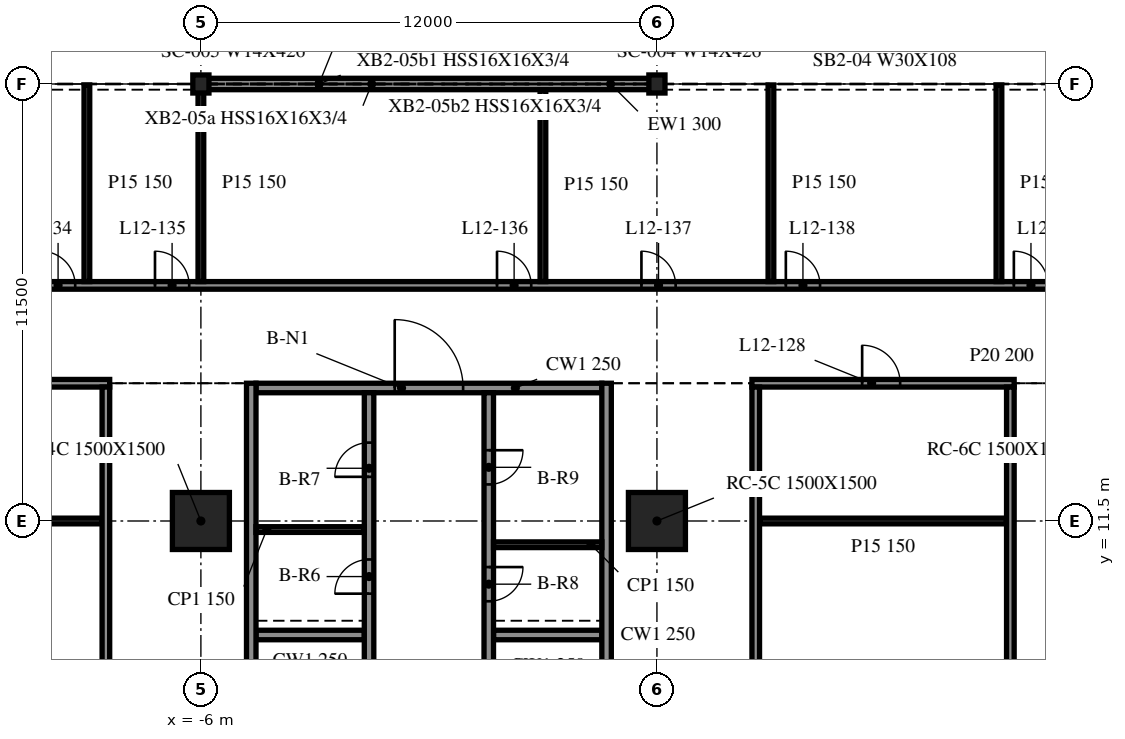
"""IFC4 building model, lengths in metres.
Left out: names, types, materials, properties, quantities, classifications, styles, units other than length and angle.
Written with IfcOpenShell. Run it as: python <this file> out.ifc"""

import sys

from ifc_helpers import new_model, si_unit, direction, frame, frame_2d, origin, origin_2d, place, context, subcontext, project, spatial, rectangle, i_section, extrude, element, fill, save


model = new_model("IFC4")
c1 = context("Model", 3, precision=1e-05, world=origin(), true_north=direction((0.0, 1.0)))
c2 = subcontext(c1, "Body", "Model", "MODEL_VIEW")
j1 = project(units=[si_unit("LENGTHUNIT", "METRE"), si_unit("PLANEANGLEUNIT", "RADIAN")], contexts=[c1])
p1 = place(None, origin())
s1 = spatial("IfcSite", under=j1, at=p1, CompositionType="ELEMENT")
p2 = place(p1, origin())
s2 = spatial("IfcBuilding", under=s1, at=p2, CompositionType="ELEMENT")
p3 = place(p2, frame((0.0, 0.0, 54.6)))
s3 = spatial("IfcBuildingStorey", under=s2, at=p3, CompositionType="ELEMENT", Elevation=54.6)
for number, where, z_axis, x_axis in (
    (1, (-6.0, 11.5, -0.34), (0.0, 0.0, 1.0), (1.0, 0.0, 0.0)),
    (2, (6.0, 11.5, -0.34), (0.0, 0.0, 1.0), (1.0, 0.0, 0.0)),
):
    element("IfcColumn", number, at=place(p3, frame(where, z_axis=z_axis, x_axis=x_axis)), inside=s3, PredefinedType="COLUMN", context=c2, shape_type="SweptSolid", body=[
        extrude(rectangle(XDim=1.5, YDim=1.5, at=origin_2d()), origin(), (0.0, 0.0, 1.0), 4.3),
    ])
for number, where, z_axis, x_axis in (
    (3, (6.0, 23.0, -0.34), (0.0, 0.0, 1.0), (1.0, 0.0, 0.0)),
    (4, (-6.0, 23.0, -0.34), (0.0, 0.0, 1.0), (1.0, 0.0, 0.0)),
):
    element("IfcColumn", number, at=place(p3, frame(where, z_axis=z_axis, x_axis=x_axis)), inside=s3, PredefinedType="COLUMN", context=c2, shape_type="SweptSolid", body=[
        extrude(i_section(OverallWidth=0.424, OverallDepth=0.475, WebThickness=0.048, FlangeThickness=0.077, at=origin_2d()), origin(), (0.0, 0.0, 1.0), 4.3),
    ])
p4 = place(p3, frame((5.976, 23.0, 0.0), z_axis=(0.0, 0.0, 1.0), x_axis=(-1.0, 0.0, 0.0)))
e5 = element("IfcWall", 5, at=p4, inside=s3, PredefinedType="NOTDEFINED", context=c2, shape_type="SweptSolid", body=[
    extrude(rectangle(XDim=11.952, YDim=0.3, at=frame_2d((5.976, 0.0))), origin(), (0.0, 0.0, 1.0), 3.203),
])
for number, where, z_axis, x_axis in (
    (6, (-4.675, 15.125, 0.0), (0.0, 0.0, 1.0), (0.0, -1.0, 0.0)),
    (7, (4.675, -9.125, 0.0), (0.0, 0.0, 1.0), (0.0, 1.0, 0.0)),
):
    element("IfcWall", number, at=place(p3, frame(where, z_axis=z_axis, x_axis=x_axis)), inside=s3, PredefinedType="SOLIDWALL", context=c2, shape_type="SweptSolid", body=[
        extrude(rectangle(XDim=24.25, YDim=0.25, at=frame_2d((12.125, 0.0))), origin(), (0.0, 0.0, 1.0), 3.96),
    ])
p5 = place(p3, frame((-4.55, 15.0, 0.0), z_axis=(0.0, 0.0, 1.0), x_axis=(1.0, 0.0, 0.0)))
e8 = element("IfcWall", 8, at=p5, inside=s3, PredefinedType="SOLIDWALL", context=c2, shape_type="SweptSolid", body=[
    extrude(rectangle(XDim=9.1, YDim=0.25, at=frame_2d((4.55, 0.0))), origin(), (0.0, 0.0, 1.0), 3.96),
])
p6 = place(p5, frame((3.65, 0.0, 0.0)))
e9 = element("IfcOpeningElement", 9, at=p6, cuts=e8, PredefinedType="OPENING", context=c2, shape_type="SweptSolid", body=[
    extrude(rectangle(XDim=1.8, YDim=2.1, at=frame_2d((0.9, 1.05))), frame((0.0, 0.135, 0.0), z_axis=(0.0, -1.0, 0.0), x_axis=(1.0, 0.0, 0.0)), (0.0, 0.0, 1.0), 0.27),
])
p7 = place(p3, frame((-1.575, -8.875, 0.0), z_axis=(0.0, 0.0, 1.0), x_axis=(0.0, 1.0, 0.0)))
e10 = element("IfcWall", 10, at=p7, inside=s3, PredefinedType="SOLIDWALL", context=c2, shape_type="SweptSolid", body=[
    extrude(rectangle(XDim=23.75, YDim=0.25, at=frame_2d((11.875, 0.0))), origin(), (0.0, 0.0, 1.0), 3.96),
])
p8 = place(p7, frame((11.425, 0.0, 0.0)))
e11 = element("IfcOpeningElement", 11, at=p8, cuts=e10, PredefinedType="OPENING", context=c2, shape_type="SweptSolid", body=[
    extrude(rectangle(XDim=0.9, YDim=2.1, at=frame_2d((0.45, 1.05))), frame((0.0, 0.135, 0.0), z_axis=(0.0, -1.0, 0.0), x_axis=(1.0, 0.0, 0.0)), (0.0, 0.0, 1.0), 0.27),
])
p9 = place(p7, frame((1.512, 0.0, 0.0)))
e12 = element("IfcOpeningElement", 12, at=p9, cuts=e10, PredefinedType="OPENING", context=c2, shape_type="SweptSolid", body=[
    extrude(rectangle(XDim=0.9, YDim=2.1, at=frame_2d((0.45, 1.05))), frame((0.0, 0.135, 0.0), z_axis=(0.0, -1.0, 0.0), x_axis=(1.0, 0.0, 0.0)), (0.0, 0.0, 1.0), 0.27),
])
p10 = place(p7, frame((4.587, 0.0, 0.0)))
e13 = element("IfcOpeningElement", 13, at=p10, cuts=e10, PredefinedType="OPENING", context=c2, shape_type="SweptSolid", body=[
    extrude(rectangle(XDim=0.9, YDim=2.1, at=frame_2d((0.45, 1.05))), frame((0.0, 0.135, 0.0), z_axis=(0.0, -1.0, 0.0), x_axis=(1.0, 0.0, 0.0)), (0.0, 0.0, 1.0), 0.27),
])
p11 = place(p7, frame((18.462, 0.0, 0.0)))
e14 = element("IfcOpeningElement", 14, at=p11, cuts=e10, PredefinedType="OPENING", context=c2, shape_type="SweptSolid", body=[
    extrude(rectangle(XDim=0.9, YDim=2.1, at=frame_2d((0.45, 1.05))), frame((0.0, 0.135, 0.0), z_axis=(0.0, -1.0, 0.0), x_axis=(1.0, 0.0, 0.0)), (0.0, 0.0, 1.0), 0.27),
])
p12 = place(p7, frame((21.538, 0.0, 0.0)))
e15 = element("IfcOpeningElement", 15, at=p12, cuts=e10, PredefinedType="OPENING", context=c2, shape_type="SweptSolid", body=[
    extrude(rectangle(XDim=0.9, YDim=2.1, at=frame_2d((0.45, 1.05))), frame((0.0, 0.135, 0.0), z_axis=(0.0, -1.0, 0.0), x_axis=(1.0, 0.0, 0.0)), (0.0, 0.0, 1.0), 0.27),
])
p13 = place(p3, frame((1.575, 14.875, 0.0), z_axis=(0.0, 0.0, 1.0), x_axis=(0.0, -1.0, 0.0)))
e16 = element("IfcWall", 16, at=p13, inside=s3, PredefinedType="SOLIDWALL", context=c2, shape_type="SweptSolid", body=[
    extrude(rectangle(XDim=17.5, YDim=0.25, at=frame_2d((8.75, 0.0))), origin(), (0.0, 0.0, 1.0), 3.96),
])
p14 = place(p13, frame((14.15, 0.0, 0.0)))
e17 = element("IfcOpeningElement", 17, at=p14, cuts=e16, PredefinedType="OPENING", context=c2, shape_type="SweptSolid", body=[
    extrude(rectangle(XDim=0.9, YDim=2.1, at=frame_2d((0.45, 1.05))), frame((0.0, 0.135, 0.0), z_axis=(0.0, -1.0, 0.0), x_axis=(1.0, 0.0, 0.0)), (0.0, 0.0, 1.0), 0.27),
])
p15 = place(p13, frame((8.7, 0.0, 0.0)))
e18 = element("IfcOpeningElement", 18, at=p15, cuts=e16, PredefinedType="OPENING", context=c2, shape_type="SweptSolid", body=[
    extrude(rectangle(XDim=0.9, YDim=2.1, at=frame_2d((0.45, 1.05))), frame((0.0, 0.135, 0.0), z_axis=(0.0, -1.0, 0.0), x_axis=(1.0, 0.0, 0.0)), (0.0, 0.0, 1.0), 0.27),
])
p16 = place(p13, frame((4.587, 0.0, 0.0)))
e19 = element("IfcOpeningElement", 19, at=p16, cuts=e16, PredefinedType="OPENING", context=c2, shape_type="SweptSolid", body=[
    extrude(rectangle(XDim=0.9, YDim=2.1, at=frame_2d((0.45, 1.05))), frame((0.0, 0.135, 0.0), z_axis=(0.0, -1.0, 0.0), x_axis=(1.0, 0.0, 0.0)), (0.0, 0.0, 1.0), 0.27),
])
p17 = place(p13, frame((1.512, 0.0, 0.0)))
e20 = element("IfcOpeningElement", 20, at=p17, cuts=e16, PredefinedType="OPENING", context=c2, shape_type="SweptSolid", body=[
    extrude(rectangle(XDim=0.9, YDim=2.1, at=frame_2d((0.45, 1.05))), frame((0.0, 0.135, 0.0), z_axis=(0.0, -1.0, 0.0), x_axis=(1.0, 0.0, 0.0)), (0.0, 0.0, 1.0), 0.27),
])
for number, where, z_axis, x_axis in (
    (21, (-4.55, 8.5, 0.0), (0.0, 0.0, 1.0), (1.0, 0.0, 0.0)),
    (22, (1.7, 8.5, 0.0), (0.0, 0.0, 1.0), (1.0, 0.0, 0.0)),
):
    element("IfcWall", number, at=place(p3, frame(where, z_axis=z_axis, x_axis=x_axis)), inside=s3, PredefinedType="SOLIDWALL", context=c2, shape_type="SweptSolid", body=[
        extrude(rectangle(XDim=2.85, YDim=0.25, at=frame_2d((1.425, 0.0))), origin(), (0.0, 0.0, 1.0), 3.96),
    ])
for number, where, z_axis, x_axis in (
    (23, (-4.55, 11.275, 0.0), (0.0, 0.0, 1.0), (1.0, 0.0, 0.0)),
    (24, (1.7, 10.875, 0.0), (0.0, 0.0, 1.0), (1.0, 0.0, 0.0)),
):
    element("IfcWall", number, at=place(p3, frame(where, z_axis=z_axis, x_axis=x_axis)), inside=s3, PredefinedType="PARTITIONING", context=c2, shape_type="SweptSolid", body=[
        extrude(rectangle(XDim=2.85, YDim=0.15, at=frame_2d((1.425, 0.0))), origin(), (0.0, 0.0, 1.0), 3.96),
    ])
p18 = place(p3, frame((-15.5, 11.5, 0.0), z_axis=(0.0, 0.0, 1.0), x_axis=(1.0, 0.0, 0.0)))
e25 = element("IfcWall", 25, at=p18, inside=s3, PredefinedType="PARTITIONING", context=c2, shape_type="SweptSolid", body=[
    extrude(rectangle(XDim=6.9, YDim=0.15, at=frame_2d((3.45, 0.0))), origin(), (0.0, 0.0, 1.0), 3.96),
])
p19 = place(p3, frame((8.7, 11.5, 0.0), z_axis=(0.0, 0.0, 1.0), x_axis=(1.0, 0.0, 0.0)))
e26 = element("IfcWall", 26, at=p19, inside=s3, PredefinedType="PARTITIONING", context=c2, shape_type="SweptSolid", body=[
    extrude(rectangle(XDim=6.5, YDim=0.15, at=frame_2d((3.25, 0.0))), origin(), (0.0, 0.0, 1.0), 3.96),
])
p20 = place(p3, frame((-15.7, 15.125, 0.0), z_axis=(0.0, 0.0, 1.0), x_axis=(1.0, 0.0, 0.0)))
e27 = element("IfcWall", 27, at=p20, inside=s3, PredefinedType="PARTITIONING", context=c2, shape_type="SweptSolid", body=[
    extrude(rectangle(XDim=7.3, YDim=0.2, at=frame_2d((3.65, 0.0))), origin(), (0.0, 0.0, 1.0), 3.96),
])
p21 = place(p20, frame((3.1, 0.0, 0.0)))
e28 = element("IfcOpeningElement", 28, at=p21, cuts=e27, PredefinedType="OPENING", context=c2, shape_type="SweptSolid", body=[
    extrude(rectangle(XDim=1.0, YDim=2.1, at=frame_2d((0.5, 1.05))), frame((0.0, 0.11, 0.0), z_axis=(0.0, -1.0, 0.0), x_axis=(1.0, 0.0, 0.0)), (0.0, 0.0, 1.0), 0.22),
])
p22 = place(p3, frame((8.5, 15.125, 0.0), z_axis=(0.0, 0.0, 1.0), x_axis=(1.0, 0.0, 0.0)))
e29 = element("IfcWall", 29, at=p22, inside=s3, PredefinedType="PARTITIONING", context=c2, shape_type="SweptSolid", body=[
    extrude(rectangle(XDim=6.9, YDim=0.2, at=frame_2d((3.45, 0.0))), origin(), (0.0, 0.0, 1.0), 3.96),
])
p23 = place(p22, frame((2.9, 0.0, 0.0)))
e30 = element("IfcOpeningElement", 30, at=p23, cuts=e29, PredefinedType="OPENING", context=c2, shape_type="SweptSolid", body=[
    extrude(rectangle(XDim=1.0, YDim=2.1, at=frame_2d((0.5, 1.05))), frame((0.0, 0.11, 0.0), z_axis=(0.0, -1.0, 0.0), x_axis=(1.0, 0.0, 0.0)), (0.0, 0.0, 1.0), 0.22),
])
p24 = place(p3, frame((-41.708, 17.7, 0.0), z_axis=(0.0, 0.0, 1.0), x_axis=(1.0, 0.0, 0.0)))
e31 = element("IfcWall", 31, at=p24, inside=s3, PredefinedType="PARTITIONING", context=c2, shape_type="SweptSolid", body=[
    extrude(rectangle(XDim=95.416, YDim=0.2, at=frame_2d((47.708, 0.0))), origin(), (0.0, 0.0, 1.0), 3.96),
])
p25 = place(p24, frame((7.5, 0.0, 0.0)))
e32 = element("IfcOpeningElement", 32, at=p25, cuts=e31, PredefinedType="OPENING", context=c2, shape_type="SweptSolid", body=[
    extrude(rectangle(XDim=0.9, YDim=2.1, at=frame_2d((0.45, 1.05))), frame((0.0, 0.11, 0.0), z_axis=(0.0, -1.0, 0.0), x_axis=(1.0, 0.0, 0.0)), (0.0, 0.0, 1.0), 0.22),
])
p26 = place(p24, frame((13.5, 0.0, 0.0)))
e33 = element("IfcOpeningElement", 33, at=p26, cuts=e31, PredefinedType="OPENING", context=c2, shape_type="SweptSolid", body=[
    extrude(rectangle(XDim=0.9, YDim=2.1, at=frame_2d((0.45, 1.05))), frame((0.0, 0.11, 0.0), z_axis=(0.0, -1.0, 0.0), x_axis=(1.0, 0.0, 0.0)), (0.0, 0.0, 1.0), 0.22),
])
p27 = place(p24, frame((19.5, 0.0, 0.0)))
e34 = element("IfcOpeningElement", 34, at=p27, cuts=e31, PredefinedType="OPENING", context=c2, shape_type="SweptSolid", body=[
    extrude(rectangle(XDim=0.9, YDim=2.1, at=frame_2d((0.45, 1.05))), frame((0.0, 0.11, 0.0), z_axis=(0.0, -1.0, 0.0), x_axis=(1.0, 0.0, 0.0)), (0.0, 0.0, 1.0), 0.22),
])
p28 = place(p24, frame((31.5, 0.0, 0.0)))
e35 = element("IfcOpeningElement", 35, at=p28, cuts=e31, PredefinedType="OPENING", context=c2, shape_type="SweptSolid", body=[
    extrude(rectangle(XDim=0.9, YDim=2.1, at=frame_2d((0.45, 1.05))), frame((0.0, 0.11, 0.0), z_axis=(0.0, -1.0, 0.0), x_axis=(1.0, 0.0, 0.0)), (0.0, 0.0, 1.0), 0.22),
])
p29 = place(p24, frame((34.5, 0.0, 0.0)))
e36 = element("IfcOpeningElement", 36, at=p29, cuts=e31, PredefinedType="OPENING", context=c2, shape_type="SweptSolid", body=[
    extrude(rectangle(XDim=0.9, YDim=2.1, at=frame_2d((0.45, 1.05))), frame((0.0, 0.11, 0.0), z_axis=(0.0, -1.0, 0.0), x_axis=(1.0, 0.0, 0.0)), (0.0, 0.0, 1.0), 0.22),
])
p30 = place(p24, frame((43.5, 0.0, 0.0)))
e37 = element("IfcOpeningElement", 37, at=p30, cuts=e31, PredefinedType="OPENING", context=c2, shape_type="SweptSolid", body=[
    extrude(rectangle(XDim=0.9, YDim=2.1, at=frame_2d((0.45, 1.05))), frame((0.0, 0.11, 0.0), z_axis=(0.0, -1.0, 0.0), x_axis=(1.0, 0.0, 0.0)), (0.0, 0.0, 1.0), 0.22),
])
p31 = place(p24, frame((47.3, 0.0, 0.0)))
e38 = element("IfcOpeningElement", 38, at=p31, cuts=e31, PredefinedType="OPENING", context=c2, shape_type="SweptSolid", body=[
    extrude(rectangle(XDim=0.9, YDim=2.1, at=frame_2d((0.45, 1.05))), frame((0.0, 0.11, 0.0), z_axis=(0.0, -1.0, 0.0), x_axis=(1.0, 0.0, 0.0)), (0.0, 0.0, 1.0), 0.22),
])
p32 = place(p24, frame((51.1, 0.0, 0.0)))
e39 = element("IfcOpeningElement", 39, at=p32, cuts=e31, PredefinedType="OPENING", context=c2, shape_type="SweptSolid", body=[
    extrude(rectangle(XDim=0.9, YDim=2.1, at=frame_2d((0.45, 1.05))), frame((0.0, 0.11, 0.0), z_axis=(0.0, -1.0, 0.0), x_axis=(1.0, 0.0, 0.0)), (0.0, 0.0, 1.0), 0.22),
])
p33 = place(p24, frame((57.1, 0.0, 0.0)))
e40 = element("IfcOpeningElement", 40, at=p33, cuts=e31, PredefinedType="OPENING", context=c2, shape_type="SweptSolid", body=[
    extrude(rectangle(XDim=0.9, YDim=2.1, at=frame_2d((0.45, 1.05))), frame((0.0, 0.11, 0.0), z_axis=(0.0, -1.0, 0.0), x_axis=(1.0, 0.0, 0.0)), (0.0, 0.0, 1.0), 0.22),
])
p34 = place(p24, frame((69.1, 0.0, 0.0)))
e41 = element("IfcOpeningElement", 41, at=p34, cuts=e31, PredefinedType="OPENING", context=c2, shape_type="SweptSolid", body=[
    extrude(rectangle(XDim=0.9, YDim=2.1, at=frame_2d((0.45, 1.05))), frame((0.0, 0.11, 0.0), z_axis=(0.0, -1.0, 0.0), x_axis=(1.0, 0.0, 0.0)), (0.0, 0.0, 1.0), 0.22),
])
p35 = place(p24, frame((72.1, 0.0, 0.0)))
e42 = element("IfcOpeningElement", 42, at=p35, cuts=e31, PredefinedType="OPENING", context=c2, shape_type="SweptSolid", body=[
    extrude(rectangle(XDim=0.9, YDim=2.1, at=frame_2d((0.45, 1.05))), frame((0.0, 0.11, 0.0), z_axis=(0.0, -1.0, 0.0), x_axis=(1.0, 0.0, 0.0)), (0.0, 0.0, 1.0), 0.22),
])
p36 = place(p24, frame((81.1, 0.0, 0.0)))
e43 = element("IfcOpeningElement", 43, at=p36, cuts=e31, PredefinedType="OPENING", context=c2, shape_type="SweptSolid", body=[
    extrude(rectangle(XDim=0.9, YDim=2.1, at=frame_2d((0.45, 1.05))), frame((0.0, 0.11, 0.0), z_axis=(0.0, -1.0, 0.0), x_axis=(1.0, 0.0, 0.0)), (0.0, 0.0, 1.0), 0.22),
])
p37 = place(p24, frame((87.1, 0.0, 0.0)))
e44 = element("IfcOpeningElement", 44, at=p37, cuts=e31, PredefinedType="OPENING", context=c2, shape_type="SweptSolid", body=[
    extrude(rectangle(XDim=0.9, YDim=2.1, at=frame_2d((0.45, 1.05))), frame((0.0, 0.11, 0.0), z_axis=(0.0, -1.0, 0.0), x_axis=(1.0, 0.0, 0.0)), (0.0, 0.0, 1.0), 0.22),
])
p38 = place(p3, frame((-9.0, 17.8, 0.0), z_axis=(0.0, 0.0, 1.0), x_axis=(0.0, 1.0, 0.0)))
e45 = element("IfcWall", 45, at=p38, inside=s3, PredefinedType="PARTITIONING", context=c2, shape_type="SweptSolid", body=[
    extrude(rectangle(XDim=5.175, YDim=0.15, at=frame_2d((2.587, 0.0))), origin(), (0.0, 0.0, 1.0), 3.96),
])
p39 = place(p3, frame((-8.5, -9.025, 0.0), z_axis=(0.0, 0.0, 1.0), x_axis=(0.0, 1.0, 0.0)))
e46 = element("IfcWall", 46, at=p39, inside=s3, PredefinedType="PARTITIONING", context=c2, shape_type="SweptSolid", body=[
    extrude(rectangle(XDim=24.05, YDim=0.2, at=frame_2d((12.025, 0.0))), origin(), (0.0, 0.0, 1.0), 3.96),
])
p40 = place(p3, frame((-6.0, 17.8, 0.0), z_axis=(0.0, 0.0, 1.0), x_axis=(0.0, 1.0, 0.0)))
e47 = element("IfcWall", 47, at=p40, inside=s3, PredefinedType="PARTITIONING", context=c2, shape_type="SweptSolid", body=[
    extrude(rectangle(XDim=5.175, YDim=0.15, at=frame_2d((2.587, 0.0))), origin(), (0.0, 0.0, 1.0), 3.96),
])
p41 = place(p3, frame((3.0, 17.8, 0.0), z_axis=(0.0, 0.0, 1.0), x_axis=(0.0, 1.0, 0.0)))
e48 = element("IfcWall", 48, at=p41, inside=s3, PredefinedType="PARTITIONING", context=c2, shape_type="SweptSolid", body=[
    extrude(rectangle(XDim=5.05, YDim=0.15, at=frame_2d((2.525, 0.0))), origin(), (0.0, 0.0, 1.0), 3.96),
])
p42 = place(p3, frame((8.6, -9.025, 0.0), z_axis=(0.0, 0.0, 1.0), x_axis=(0.0, 1.0, 0.0)))
e49 = element("IfcWall", 49, at=p42, inside=s3, PredefinedType="PARTITIONING", context=c2, shape_type="SweptSolid", body=[
    extrude(rectangle(XDim=24.05, YDim=0.2, at=frame_2d((12.025, 0.0))), origin(), (0.0, 0.0, 1.0), 3.96),
])
p43 = place(p42, frame((12.3, 0.0, 0.0)))
e50 = element("IfcOpeningElement", 50, at=p43, cuts=e49, PredefinedType="OPENING", context=c2, shape_type="SweptSolid", body=[
    extrude(rectangle(XDim=1.0, YDim=2.1, at=frame_2d((0.5, 1.05))), frame((0.0, 0.11, 0.0), z_axis=(0.0, -1.0, 0.0), x_axis=(1.0, 0.0, 0.0)), (0.0, 0.0, 1.0), 0.22),
])
for number, where, z_axis, x_axis in (
    (51, (9.0, 17.8, 0.0), (0.0, 0.0, 1.0), (0.0, 1.0, 0.0)),
    (52, (15.0, 17.8, 0.0), (0.0, 0.0, 1.0), (0.0, 1.0, 0.0)),
):
    element("IfcWall", number, at=place(p3, frame(where, z_axis=z_axis, x_axis=x_axis)), inside=s3, PredefinedType="PARTITIONING", context=c2, shape_type="SweptSolid", body=[
        extrude(rectangle(XDim=5.175, YDim=0.15, at=frame_2d((2.587, 0.0))), origin(), (0.0, 0.0, 1.0), 3.96),
    ])
p44 = place(p3, frame((15.3, -9.025, 0.0), z_axis=(0.0, 0.0, 1.0), x_axis=(0.0, 1.0, 0.0)))
e53 = element("IfcWall", 53, at=p44, inside=s3, PredefinedType="PARTITIONING", context=c2, shape_type="SweptSolid", body=[
    extrude(rectangle(XDim=24.05, YDim=0.2, at=frame_2d((12.025, 0.0))), origin(), (0.0, 0.0, 1.0), 3.96),
])
p45 = place(p6, origin())
e54 = element("IfcDoor", 54, at=p45, inside=s3, OperationType="DOUBLE_DOOR_SINGLE_SWING", PredefinedType="DOOR", context=c2, shape_type="SweptSolid", body=[
    extrude(rectangle(XDim=1.8, YDim=2.1, at=frame_2d((0.9, 1.05))), frame((0.0, 0.025, 0.0), z_axis=(0.0, -1.0, 0.0), x_axis=(1.0, 0.0, 0.0)), (0.0, 0.0, 1.0), 0.05),
])
fill(e9, e54)
p46 = place(p11, origin())
e55 = element("IfcDoor", 55, at=p46, inside=s3, OperationType="SINGLE_SWING_RIGHT", PredefinedType="DOOR", context=c2, shape_type="SweptSolid", body=[
    extrude(rectangle(XDim=0.9, YDim=2.1, at=frame_2d((0.45, 1.05))), frame((0.0, 0.025, 0.0), z_axis=(0.0, -1.0, 0.0), x_axis=(1.0, 0.0, 0.0)), (0.0, 0.0, 1.0), 0.05),
])
fill(e14, e55)
p47 = place(p12, origin())
e56 = element("IfcDoor", 56, at=p47, inside=s3, OperationType="SINGLE_SWING_LEFT", PredefinedType="DOOR", context=c2, shape_type="SweptSolid", body=[
    extrude(rectangle(XDim=0.9, YDim=2.1, at=frame_2d((0.45, 1.05))), frame((0.0, 0.025, 0.0), z_axis=(0.0, -1.0, 0.0), x_axis=(1.0, 0.0, 0.0)), (0.0, 0.0, 1.0), 0.05),
])
fill(e15, e56)
p48 = place(p16, origin())
e57 = element("IfcDoor", 57, at=p48, inside=s3, OperationType="SINGLE_SWING_RIGHT", PredefinedType="DOOR", context=c2, shape_type="SweptSolid", body=[
    extrude(rectangle(XDim=0.9, YDim=2.1, at=frame_2d((0.45, 1.05))), frame((0.0, 0.025, 0.0), z_axis=(0.0, -1.0, 0.0), x_axis=(1.0, 0.0, 0.0)), (0.0, 0.0, 1.0), 0.05),
])
fill(e19, e57)
p49 = place(p17, origin())
e58 = element("IfcDoor", 58, at=p49, inside=s3, OperationType="SINGLE_SWING_LEFT", PredefinedType="DOOR", context=c2, shape_type="SweptSolid", body=[
    extrude(rectangle(XDim=0.9, YDim=2.1, at=frame_2d((0.45, 1.05))), frame((0.0, 0.025, 0.0), z_axis=(0.0, -1.0, 0.0), x_axis=(1.0, 0.0, 0.0)), (0.0, 0.0, 1.0), 0.05),
])
fill(e20, e58)
p50 = place(p23, origin())
e59 = element("IfcDoor", 59, at=p50, inside=s3, OperationType="SINGLE_SWING_RIGHT", PredefinedType="DOOR", context=c2, shape_type="SweptSolid", body=[
    extrude(rectangle(XDim=1.0, YDim=2.1, at=frame_2d((0.5, 1.05))), frame((0.0, 0.025, 0.0), z_axis=(0.0, -1.0, 0.0), x_axis=(1.0, 0.0, 0.0)), (0.0, 0.0, 1.0), 0.05),
])
fill(e30, e59)
p51 = place(p28, origin())
e60 = element("IfcDoor", 60, at=p51, inside=s3, OperationType="SINGLE_SWING_LEFT", PredefinedType="DOOR", context=c2, shape_type="SweptSolid", body=[
    extrude(rectangle(XDim=0.9, YDim=2.1, at=frame_2d((0.45, 1.05))), frame((0.0, 0.025, 0.0), z_axis=(0.0, -1.0, 0.0), x_axis=(1.0, 0.0, 0.0)), (0.0, 0.0, 1.0), 0.05),
])
fill(e35, e60)
p52 = place(p29, origin())
e61 = element("IfcDoor", 61, at=p52, inside=s3, OperationType="SINGLE_SWING_LEFT", PredefinedType="DOOR", context=c2, shape_type="SweptSolid", body=[
    extrude(rectangle(XDim=0.9, YDim=2.1, at=frame_2d((0.45, 1.05))), frame((0.0, 0.025, 0.0), z_axis=(0.0, -1.0, 0.0), x_axis=(1.0, 0.0, 0.0)), (0.0, 0.0, 1.0), 0.05),
])
fill(e36, e61)
p53 = place(p30, origin())
e62 = element("IfcDoor", 62, at=p53, inside=s3, OperationType="SINGLE_SWING_LEFT", PredefinedType="DOOR", context=c2, shape_type="SweptSolid", body=[
    extrude(rectangle(XDim=0.9, YDim=2.1, at=frame_2d((0.45, 1.05))), frame((0.0, 0.025, 0.0), z_axis=(0.0, -1.0, 0.0), x_axis=(1.0, 0.0, 0.0)), (0.0, 0.0, 1.0), 0.05),
])
fill(e37, e62)
p54 = place(p31, origin())
e63 = element("IfcDoor", 63, at=p54, inside=s3, OperationType="SINGLE_SWING_RIGHT", PredefinedType="DOOR", context=c2, shape_type="SweptSolid", body=[
    extrude(rectangle(XDim=0.9, YDim=2.1, at=frame_2d((0.45, 1.05))), frame((0.0, 0.025, 0.0), z_axis=(0.0, -1.0, 0.0), x_axis=(1.0, 0.0, 0.0)), (0.0, 0.0, 1.0), 0.05),
])
fill(e38, e63)
p55 = place(p32, origin())
e64 = element("IfcDoor", 64, at=p55, inside=s3, OperationType="SINGLE_SWING_RIGHT", PredefinedType="DOOR", context=c2, shape_type="SweptSolid", body=[
    extrude(rectangle(XDim=0.9, YDim=2.1, at=frame_2d((0.45, 1.05))), frame((0.0, 0.025, 0.0), z_axis=(0.0, -1.0, 0.0), x_axis=(1.0, 0.0, 0.0)), (0.0, 0.0, 1.0), 0.05),
])
fill(e39, e64)
p56 = place(p33, origin())
e65 = element("IfcDoor", 65, at=p56, inside=s3, OperationType="SINGLE_SWING_RIGHT", PredefinedType="DOOR", context=c2, shape_type="SweptSolid", body=[
    extrude(rectangle(XDim=0.9, YDim=2.1, at=frame_2d((0.45, 1.05))), frame((0.0, 0.025, 0.0), z_axis=(0.0, -1.0, 0.0), x_axis=(1.0, 0.0, 0.0)), (0.0, 0.0, 1.0), 0.05),
])
fill(e40, e65)
save(model, sys.argv[1])
